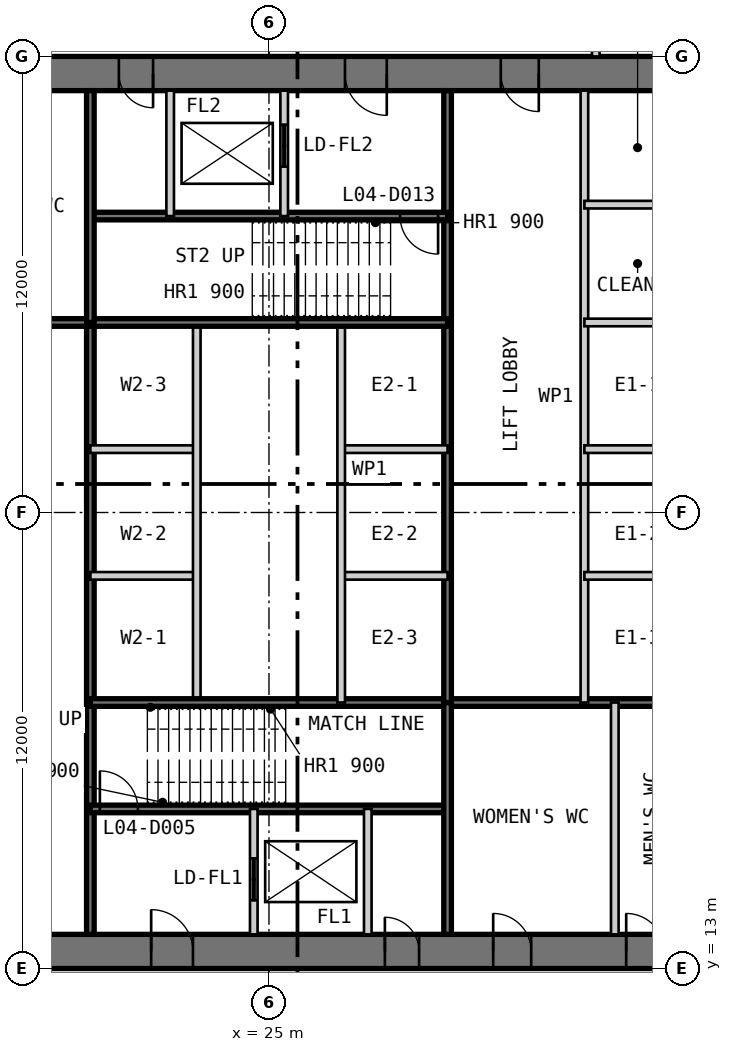
"""IFC4 building model, lengths in metres.
Left out: names, types, materials, properties, quantities, classifications, styles, units other than length and angle.
Written with IfcOpenShell. Run it as: python <this file> out.ifc"""

import sys

from ifc_helpers import new_model, si_unit, direction, frame, frame_2d, origin, place, context, subcontext, project, spatial, polyline, rectangle, outline, extrude, element, fill, save


model = new_model("IFC4")
c1 = context("Model", 3, precision=1e-05, world=origin(), true_north=direction((0.0, 1.0)))
c2 = subcontext(c1, "Body", "Model", "MODEL_VIEW")
j1 = project(units=[si_unit("LENGTHUNIT", "METRE"), si_unit("PLANEANGLEUNIT", "RADIAN")], contexts=[c1])
p1 = place(None, origin())
s1 = spatial("IfcSite", under=j1, at=p1, CompositionType="ELEMENT")
p2 = place(p1, origin())
s2 = spatial("IfcBuilding", under=s1, at=p2, CompositionType="ELEMENT")
p3 = place(p2, frame((0.0, 0.0, 21.4)))
s3 = spatial("IfcBuildingStorey", under=s2, at=p3, CompositionType="ELEMENT", Elevation=21.4)
p4 = place(p3, frame((13.0, 13.45, 0.0), z_axis=(0.0, 0.0, 1.0), x_axis=(1.0, 0.0, 0.0)))
e1 = element("IfcWall", 1, at=p4, inside=s3, PredefinedType="SHEAR", context=c2, shape_type="SweptSolid", body=[
    extrude(outline(polyline([(0.0, -0.45), (24.0, -0.45), (23.1, 0.45), (0.9, 0.45), (0.0, -0.45)])), origin(), (0.0, 0.0, 1.0), 4.8),
])
p5 = place(p4, frame((4.9, 0.0, 0.0)))
e2 = element("IfcOpeningElement", 2, at=p5, cuts=e1, PredefinedType="OPENING", context=c2, shape_type="SweptSolid", body=[
    extrude(rectangle(XDim=1.0, YDim=2.2, at=frame_2d((0.5, 1.1))), frame((0.0, 0.46, 0.0), z_axis=(0.0, -1.0, 0.0), x_axis=(1.0, 0.0, 0.0)), (0.0, 0.0, 1.0), 0.92),
])
p6 = place(p4, frame((8.9, 0.0, 0.0)))
e3 = element("IfcOpeningElement", 3, at=p6, cuts=e1, PredefinedType="OPENING", context=c2, shape_type="SweptSolid", body=[
    extrude(rectangle(XDim=1.1, YDim=2.2, at=frame_2d((0.55, 1.1))), frame((0.0, 0.46, 0.0), z_axis=(0.0, -1.0, 0.0), x_axis=(1.0, 0.0, 0.0)), (0.0, 0.0, 1.0), 0.92),
])
p7 = place(p4, frame((15.05, 0.0, 0.0)))
e4 = element("IfcOpeningElement", 4, at=p7, cuts=e1, PredefinedType="OPENING", context=c2, shape_type="SweptSolid", body=[
    extrude(rectangle(XDim=0.9, YDim=2.2, at=frame_2d((0.45, 1.1))), frame((0.0, 0.46, 0.0), z_axis=(0.0, -1.0, 0.0), x_axis=(1.0, 0.0, 0.0)), (0.0, 0.0, 1.0), 0.92),
])
p8 = place(p4, frame((17.9, 0.0, 0.0)))
e5 = element("IfcOpeningElement", 5, at=p8, cuts=e1, PredefinedType="OPENING", context=c2, shape_type="SweptSolid", body=[
    extrude(rectangle(XDim=1.0, YDim=2.2, at=frame_2d((0.5, 1.1))), frame((0.0, 0.46, 0.0), z_axis=(0.0, -1.0, 0.0), x_axis=(1.0, 0.0, 0.0)), (0.0, 0.0, 1.0), 0.92),
])
p9 = place(p4, frame((21.4, 0.0, 0.0)))
e6 = element("IfcOpeningElement", 6, at=p9, cuts=e1, PredefinedType="OPENING", context=c2, shape_type="SweptSolid", body=[
    extrude(rectangle(XDim=1.0, YDim=2.2, at=frame_2d((0.5, 1.1))), frame((0.0, 0.46, 0.0), z_axis=(0.0, -1.0, 0.0), x_axis=(1.0, 0.0, 0.0)), (0.0, 0.0, 1.0), 0.92),
])
p10 = place(p3, frame((37.0, 36.55, 0.0), z_axis=(0.0, 0.0, 1.0), x_axis=(-1.0, 0.0, 0.0)))
e7 = element("IfcWall", 7, at=p10, inside=s3, PredefinedType="SHEAR", context=c2, shape_type="SweptSolid", body=[
    extrude(outline(polyline([(0.0, -0.45), (24.0, -0.45), (23.1, 0.45), (0.9, 0.45), (0.0, -0.45)])), origin(), (0.0, 0.0, 1.0), 4.8),
])
p11 = place(p10, frame((4.9, 0.0, 0.0)))
e8 = element("IfcOpeningElement", 8, at=p11, cuts=e7, PredefinedType="OPENING", context=c2, shape_type="SweptSolid", body=[
    extrude(rectangle(XDim=1.0, YDim=2.2, at=frame_2d((0.5, 1.1))), frame((0.0, 0.46, 0.0), z_axis=(0.0, -1.0, 0.0), x_axis=(1.0, 0.0, 0.0)), (0.0, 0.0, 1.0), 0.92),
])
p12 = place(p10, frame((8.9, 0.0, 0.0)))
e9 = element("IfcOpeningElement", 9, at=p12, cuts=e7, PredefinedType="OPENING", context=c2, shape_type="SweptSolid", body=[
    extrude(rectangle(XDim=1.1, YDim=2.2, at=frame_2d((0.55, 1.1))), frame((0.0, 0.46, 0.0), z_axis=(0.0, -1.0, 0.0), x_axis=(1.0, 0.0, 0.0)), (0.0, 0.0, 1.0), 0.92),
])
p13 = place(p10, frame((15.05, 0.0, 0.0)))
e10 = element("IfcOpeningElement", 10, at=p13, cuts=e7, PredefinedType="OPENING", context=c2, shape_type="SweptSolid", body=[
    extrude(rectangle(XDim=0.9, YDim=2.2, at=frame_2d((0.45, 1.1))), frame((0.0, 0.46, 0.0), z_axis=(0.0, -1.0, 0.0), x_axis=(1.0, 0.0, 0.0)), (0.0, 0.0, 1.0), 0.92),
])
p14 = place(p10, frame((17.9, 0.0, 0.0)))
e11 = element("IfcOpeningElement", 11, at=p14, cuts=e7, PredefinedType="OPENING", context=c2, shape_type="SweptSolid", body=[
    extrude(rectangle(XDim=1.0, YDim=2.2, at=frame_2d((0.5, 1.1))), frame((0.0, 0.46, 0.0), z_axis=(0.0, -1.0, 0.0), x_axis=(1.0, 0.0, 0.0)), (0.0, 0.0, 1.0), 0.92),
])
p15 = place(p10, frame((21.4, 0.0, 0.0)))
e12 = element("IfcOpeningElement", 12, at=p15, cuts=e7, PredefinedType="OPENING", context=c2, shape_type="SweptSolid", body=[
    extrude(rectangle(XDim=1.0, YDim=2.2, at=frame_2d((0.5, 1.1))), frame((0.0, 0.46, 0.0), z_axis=(0.0, -1.0, 0.0), x_axis=(1.0, 0.0, 0.0)), (0.0, 0.0, 1.0), 0.92),
])
p16 = place(p3, frame((20.3, 13.9, 0.0), z_axis=(0.0, 0.0, 1.0), x_axis=(0.0, 1.0, 0.0)))
e13 = element("IfcWall", 13, at=p16, inside=s3, PredefinedType="SOLIDWALL", context=c2, shape_type="SweptSolid", body=[
    extrude(rectangle(XDim=16.1, YDim=0.2, at=frame_2d((8.05, 0.0))), origin(), (0.0, 0.0, 1.0), 4.6),
])
for number, where, z_axis, x_axis in (
    (14, (20.3, 23.333, 0.0), (0.0, 0.0, 1.0), (1.0, 0.0, 0.0)),
    (15, (20.3, 26.667, 0.0), (0.0, 0.0, 1.0), (1.0, 0.0, 0.0)),
):
    element("IfcWall", number, at=place(p3, frame(where, z_axis=z_axis, x_axis=x_axis)), inside=s3, PredefinedType="PARTITIONING", context=c2, shape_type="SweptSolid", body=[
        extrude(rectangle(XDim=2.8, YDim=0.2, at=frame_2d((1.4, 0.0))), origin(), (0.0, 0.0, 1.0), 4.6),
    ])
p17 = place(p3, frame((23.1, 20.0, 0.0), z_axis=(0.0, 0.0, 1.0), x_axis=(0.0, 1.0, 0.0)))
e16 = element("IfcWall", 16, at=p17, inside=s3, PredefinedType="PARTITIONING", context=c2, shape_type="SweptSolid", body=[
    extrude(rectangle(XDim=10.0, YDim=0.2, at=frame_2d((5.0, 0.0))), origin(), (0.0, 0.0, 1.0), 4.6),
])
p18 = place(p3, frame((20.3, 17.2, 0.0), z_axis=(0.0, 0.0, 1.0), x_axis=(1.0, 0.0, 0.0)))
e17 = element("IfcWall", 17, at=p18, inside=s3, PredefinedType="SOLIDWALL", context=c2, shape_type="SweptSolid", body=[
    extrude(rectangle(XDim=9.4, YDim=0.2, at=frame_2d((4.7, 0.0))), origin(), (0.0, 0.0, 1.0), 4.6),
])
p19 = place(p18, frame((0.25, 0.0, 0.0)))
e18 = element("IfcOpeningElement", 18, at=p19, cuts=e17, PredefinedType="OPENING", context=c2, shape_type="SweptSolid", body=[
    extrude(rectangle(XDim=1.0, YDim=2.2, at=frame_2d((0.5, 1.1))), frame((0.0, 0.11, 0.0), z_axis=(0.0, -1.0, 0.0), x_axis=(1.0, 0.0, 0.0)), (0.0, 0.0, 1.0), 0.22),
])
p20 = place(p3, frame((20.3, 20.0, 0.0), z_axis=(0.0, 0.0, 1.0), x_axis=(1.0, 0.0, 0.0)))
e19 = element("IfcWall", 19, at=p20, inside=s3, PredefinedType="SOLIDWALL", context=c2, shape_type="SweptSolid", body=[
    extrude(rectangle(XDim=15.8, YDim=0.2, at=frame_2d((7.9, 0.0))), origin(), (0.0, 0.0, 1.0), 4.6),
])
p21 = place(p3, frame((24.6, 13.9, 0.0), z_axis=(0.0, 0.0, 1.0), x_axis=(0.0, 1.0, 0.0)))
e20 = element("IfcWall", 20, at=p21, inside=s3, PredefinedType="PARTITIONING", context=c2, shape_type="SweptSolid", body=[
    extrude(rectangle(XDim=3.3, YDim=0.2, at=frame_2d((1.65, 0.0))), origin(), (0.0, 0.0, 1.0), 4.6),
])
p22 = place(p21, frame((0.9, 0.0, 0.0)))
e21 = element("IfcOpeningElement", 21, at=p22, cuts=e20, PredefinedType="OPENING", context=c2, shape_type="SweptSolid", body=[
    extrude(rectangle(XDim=1.1, YDim=2.2, at=frame_2d((0.55, 1.1))), frame((0.0, 0.11, 0.0), z_axis=(0.0, -1.0, 0.0), x_axis=(1.0, 0.0, 0.0)), (0.0, 0.0, 1.0), 0.22),
])
p23 = place(p3, frame((27.6, 13.9, 0.0), z_axis=(0.0, 0.0, 1.0), x_axis=(0.0, 1.0, 0.0)))
e22 = element("IfcWall", 22, at=p23, inside=s3, PredefinedType="PARTITIONING", context=c2, shape_type="SweptSolid", body=[
    extrude(rectangle(XDim=3.3, YDim=0.2, at=frame_2d((1.65, 0.0))), origin(), (0.0, 0.0, 1.0), 4.6),
])
p24 = place(p3, frame((29.7, 13.9, 0.0), z_axis=(0.0, 0.0, 1.0), x_axis=(0.0, 1.0, 0.0)))
e23 = element("IfcWall", 23, at=p24, inside=s3, PredefinedType="SOLIDWALL", context=c2, shape_type="SweptSolid", body=[
    extrude(rectangle(XDim=6.1, YDim=0.2, at=frame_2d((3.05, 0.0))), origin(), (0.0, 0.0, 1.0), 4.6),
])
p25 = place(p3, frame((34.1, 13.9, 0.0), z_axis=(0.0, 0.0, 1.0), x_axis=(0.0, 1.0, 0.0)))
e24 = element("IfcWall", 24, at=p25, inside=s3, PredefinedType="PARTITIONING", context=c2, shape_type="SweptSolid", body=[
    extrude(rectangle(XDim=6.1, YDim=0.2, at=frame_2d((3.05, 0.0))), origin(), (0.0, 0.0, 1.0), 4.6),
])
p26 = place(p3, frame((33.3, 36.1, 0.0), z_axis=(0.0, 0.0, 1.0), x_axis=(0.0, -1.0, 0.0)))
e25 = element("IfcWall", 25, at=p26, inside=s3, PredefinedType="PARTITIONING", context=c2, shape_type="SweptSolid", body=[
    extrude(rectangle(XDim=16.1, YDim=0.2, at=frame_2d((8.05, 0.0))), origin(), (0.0, 0.0, 1.0), 4.6),
])
p27 = place(p3, frame((29.7, 36.1, 0.0), z_axis=(0.0, 0.0, 1.0), x_axis=(0.0, -1.0, 0.0)))
e26 = element("IfcWall", 26, at=p27, inside=s3, PredefinedType="SOLIDWALL", context=c2, shape_type="SweptSolid", body=[
    extrude(rectangle(XDim=16.1, YDim=0.2, at=frame_2d((8.05, 0.0))), origin(), (0.0, 0.0, 1.0), 4.6),
])
for number, where, z_axis, x_axis in (
    (27, (36.1, 30.0, 0.0), (0.0, 0.0, 1.0), (-1.0, 0.0, 0.0)),
    (28, (36.1, 26.667, 0.0), (0.0, 0.0, 1.0), (-1.0, 0.0, 0.0)),
    (29, (36.1, 23.333, 0.0), (0.0, 0.0, 1.0), (-1.0, 0.0, 0.0)),
    (30, (29.7, 26.667, 0.0), (0.0, 0.0, 1.0), (-1.0, 0.0, 0.0)),
    (31, (29.7, 23.333, 0.0), (0.0, 0.0, 1.0), (-1.0, 0.0, 0.0)),
):
    element("IfcWall", number, at=place(p3, frame(where, z_axis=z_axis, x_axis=x_axis)), inside=s3, PredefinedType="PARTITIONING", context=c2, shape_type="SweptSolid", body=[
        extrude(rectangle(XDim=2.8, YDim=0.2, at=frame_2d((1.4, 0.0))), origin(), (0.0, 0.0, 1.0), 4.6),
    ])
p28 = place(p3, frame((26.9, 30.0, 0.0), z_axis=(0.0, 0.0, 1.0), x_axis=(0.0, -1.0, 0.0)))
e32 = element("IfcWall", 32, at=p28, inside=s3, PredefinedType="PARTITIONING", context=c2, shape_type="SweptSolid", body=[
    extrude(rectangle(XDim=10.0, YDim=0.2, at=frame_2d((5.0, 0.0))), origin(), (0.0, 0.0, 1.0), 4.6),
])
p29 = place(p3, frame((29.7, 32.8, 0.0), z_axis=(0.0, 0.0, 1.0), x_axis=(-1.0, 0.0, 0.0)))
e33 = element("IfcWall", 33, at=p29, inside=s3, PredefinedType="SOLIDWALL", context=c2, shape_type="SweptSolid", body=[
    extrude(rectangle(XDim=9.4, YDim=0.2, at=frame_2d((4.7, 0.0))), origin(), (0.0, 0.0, 1.0), 4.6),
])
p30 = place(p29, frame((0.25, 0.0, 0.0)))
e34 = element("IfcOpeningElement", 34, at=p30, cuts=e33, PredefinedType="OPENING", context=c2, shape_type="SweptSolid", body=[
    extrude(rectangle(XDim=1.0, YDim=2.2, at=frame_2d((0.5, 1.1))), frame((0.0, 0.11, 0.0), z_axis=(0.0, -1.0, 0.0), x_axis=(1.0, 0.0, 0.0)), (0.0, 0.0, 1.0), 0.22),
])
p31 = place(p3, frame((29.7, 30.0, 0.0), z_axis=(0.0, 0.0, 1.0), x_axis=(-1.0, 0.0, 0.0)))
e35 = element("IfcWall", 35, at=p31, inside=s3, PredefinedType="SOLIDWALL", context=c2, shape_type="SweptSolid", body=[
    extrude(rectangle(XDim=15.8, YDim=0.2, at=frame_2d((7.9, 0.0))), origin(), (0.0, 0.0, 1.0), 4.6),
])
p32 = place(p3, frame((25.4, 36.1, 0.0), z_axis=(0.0, 0.0, 1.0), x_axis=(0.0, -1.0, 0.0)))
e36 = element("IfcWall", 36, at=p32, inside=s3, PredefinedType="PARTITIONING", context=c2, shape_type="SweptSolid", body=[
    extrude(rectangle(XDim=3.3, YDim=0.2, at=frame_2d((1.65, 0.0))), origin(), (0.0, 0.0, 1.0), 4.6),
])
p33 = place(p32, frame((0.9, 0.0, 0.0)))
e37 = element("IfcOpeningElement", 37, at=p33, cuts=e36, PredefinedType="OPENING", context=c2, shape_type="SweptSolid", body=[
    extrude(rectangle(XDim=1.1, YDim=2.2, at=frame_2d((0.55, 1.1))), frame((0.0, 0.11, 0.0), z_axis=(0.0, -1.0, 0.0), x_axis=(1.0, 0.0, 0.0)), (0.0, 0.0, 1.0), 0.22),
])
p34 = place(p3, frame((22.4, 36.1, 0.0), z_axis=(0.0, 0.0, 1.0), x_axis=(0.0, -1.0, 0.0)))
e38 = element("IfcWall", 38, at=p34, inside=s3, PredefinedType="PARTITIONING", context=c2, shape_type="SweptSolid", body=[
    extrude(rectangle(XDim=3.3, YDim=0.2, at=frame_2d((1.65, 0.0))), origin(), (0.0, 0.0, 1.0), 4.6),
])
p35 = place(p3, frame((20.3, 36.1, 0.0), z_axis=(0.0, 0.0, 1.0), x_axis=(0.0, -1.0, 0.0)))
e39 = element("IfcWall", 39, at=p35, inside=s3, PredefinedType="SOLIDWALL", context=c2, shape_type="SweptSolid", body=[
    extrude(rectangle(XDim=6.1, YDim=0.2, at=frame_2d((3.05, 0.0))), origin(), (0.0, 0.0, 1.0), 4.6),
])
p36 = place(p3, frame((36.1, 33.1, 0.0), z_axis=(0.0, 0.0, 1.0), x_axis=(-1.0, 0.0, 0.0)))
e40 = element("IfcWall", 40, at=p36, inside=s3, PredefinedType="PARTITIONING", context=c2, shape_type="SweptSolid", body=[
    extrude(rectangle(XDim=2.8, YDim=0.2, at=frame_2d((1.4, 0.0))), origin(), (0.0, 0.0, 1.0), 4.6),
])
p37 = place(p3, frame((33.6, 37.0, 0.0), z_axis=(0.0, 0.0, 1.0), x_axis=(0.0, 1.0, 0.0)))
e41 = element("IfcWall", 41, at=p37, inside=s3, PredefinedType="PARTITIONING", context=c2, shape_type="SweptSolid", body=[
    extrude(rectangle(XDim=6.0, YDim=0.2, at=frame_2d((3.0, 0.0))), origin(), (0.0, 0.0, 1.0), 4.5),
])
p38 = place(p37, frame((2.55, 0.0, 0.0)))
e42 = element("IfcOpeningElement", 42, at=p38, cuts=e41, PredefinedType="OPENING", context=c2, shape_type="SweptSolid", body=[
    extrude(rectangle(XDim=0.9, YDim=2.2, at=frame_2d((0.45, 1.1))), frame((0.0, 0.11, 0.0), z_axis=(0.0, -1.0, 0.0), x_axis=(1.0, 0.0, 0.0)), (0.0, 0.0, 1.0), 0.22),
])
p39 = place(p6, origin())
e43 = element("IfcDoor", 43, at=p39, inside=s3, OperationType="SINGLE_SWING_LEFT", PredefinedType="DOOR", context=c2, shape_type="SweptSolid", body=[
    extrude(rectangle(XDim=1.1, YDim=2.2, at=frame_2d((0.55, 1.1))), frame((0.0, 0.025, 0.0), z_axis=(0.0, -1.0, 0.0), x_axis=(1.0, 0.0, 0.0)), (0.0, 0.0, 1.0), 0.05),
    extrude(outline(polyline([(0.0, 0.0), (0.04, 0.0), (0.04, 2.16), (1.06, 2.16), (1.06, 0.0), (1.1, 0.0), (1.1, 2.2), (0.0, 2.2), (0.0, 0.0)])), frame((0.0, 0.3, 0.0), z_axis=(0.0, -1.0, 0.0), x_axis=(1.0, 0.0, 0.0)), (0.0, 0.0, 1.0), 0.6),
])
fill(e3, e43)
p40 = place(p19, origin())
e44 = element("IfcDoor", 44, at=p40, inside=s3, OperationType="SINGLE_SWING_LEFT", PredefinedType="DOOR", context=c2, shape_type="SweptSolid", body=[
    extrude(rectangle(XDim=1.0, YDim=2.2, at=frame_2d((0.5, 1.1))), frame((0.0, 0.025, 0.0), z_axis=(0.0, -1.0, 0.0), x_axis=(1.0, 0.0, 0.0)), (0.0, 0.0, 1.0), 0.05),
])
fill(e18, e44)
p41 = place(p7, origin())
e45 = element("IfcDoor", 45, at=p41, inside=s3, OperationType="SINGLE_SWING_LEFT", PredefinedType="DOOR", context=c2, shape_type="SweptSolid", body=[
    extrude(rectangle(XDim=0.9, YDim=2.2, at=frame_2d((0.45, 1.1))), frame((0.0, 0.025, 0.0), z_axis=(0.0, -1.0, 0.0), x_axis=(1.0, 0.0, 0.0)), (0.0, 0.0, 1.0), 0.05),
    extrude(outline(polyline([(0.0, 0.0), (0.04, 0.0), (0.04, 2.16), (0.86, 2.16), (0.86, 0.0), (0.9, 0.0), (0.9, 2.2), (0.0, 2.2), (0.0, 0.0)])), frame((0.0, 0.3, 0.0), z_axis=(0.0, -1.0, 0.0), x_axis=(1.0, 0.0, 0.0)), (0.0, 0.0, 1.0), 0.6),
])
fill(e4, e45)
p42 = place(p8, origin())
e46 = element("IfcDoor", 46, at=p42, inside=s3, OperationType="SINGLE_SWING_LEFT", PredefinedType="DOOR", context=c2, shape_type="SweptSolid", body=[
    extrude(rectangle(XDim=1.0, YDim=2.2, at=frame_2d((0.5, 1.1))), frame((0.0, 0.025, 0.0), z_axis=(0.0, -1.0, 0.0), x_axis=(1.0, 0.0, 0.0)), (0.0, 0.0, 1.0), 0.05),
    extrude(outline(polyline([(0.0, 0.0), (0.04, 0.0), (0.04, 2.16), (0.96, 2.16), (0.96, 0.0), (1.0, 0.0), (1.0, 2.2), (0.0, 2.2), (0.0, 0.0)])), frame((0.0, 0.3, 0.0), z_axis=(0.0, -1.0, 0.0), x_axis=(1.0, 0.0, 0.0)), (0.0, 0.0, 1.0), 0.6),
])
fill(e5, e46)
p43 = place(p9, origin())
e47 = element("IfcDoor", 47, at=p43, inside=s3, OperationType="SINGLE_SWING_LEFT", PredefinedType="DOOR", context=c2, shape_type="SweptSolid", body=[
    extrude(rectangle(XDim=1.0, YDim=2.2, at=frame_2d((0.5, 1.1))), frame((0.0, 0.025, 0.0), z_axis=(0.0, -1.0, 0.0), x_axis=(1.0, 0.0, 0.0)), (0.0, 0.0, 1.0), 0.05),
    extrude(outline(polyline([(0.0, 0.0), (0.04, 0.0), (0.04, 2.16), (0.96, 2.16), (0.96, 0.0), (1.0, 0.0), (1.0, 2.2), (0.0, 2.2), (0.0, 0.0)])), frame((0.0, 0.3, 0.0), z_axis=(0.0, -1.0, 0.0), x_axis=(1.0, 0.0, 0.0)), (0.0, 0.0, 1.0), 0.6),
])
fill(e6, e47)
p44 = place(p11, origin())
e48 = element("IfcDoor", 48, at=p44, inside=s3, OperationType="SINGLE_SWING_LEFT", PredefinedType="DOOR", context=c2, shape_type="SweptSolid", body=[
    extrude(rectangle(XDim=1.0, YDim=2.2, at=frame_2d((0.5, 1.1))), frame((0.0, 0.025, 0.0), z_axis=(0.0, -1.0, 0.0), x_axis=(1.0, 0.0, 0.0)), (0.0, 0.0, 1.0), 0.05),
    extrude(outline(polyline([(0.0, 0.0), (0.04, 0.0), (0.04, 2.16), (0.96, 2.16), (0.96, 0.0), (1.0, 0.0), (1.0, 2.2), (0.0, 2.2), (0.0, 0.0)])), frame((0.0, 0.3, 0.0), z_axis=(0.0, -1.0, 0.0), x_axis=(1.0, 0.0, 0.0)), (0.0, 0.0, 1.0), 0.6),
])
fill(e8, e48)
p45 = place(p12, origin())
e49 = element("IfcDoor", 49, at=p45, inside=s3, OperationType="SINGLE_SWING_LEFT", PredefinedType="DOOR", context=c2, shape_type="SweptSolid", body=[
    extrude(rectangle(XDim=1.1, YDim=2.2, at=frame_2d((0.55, 1.1))), frame((0.0, 0.025, 0.0), z_axis=(0.0, -1.0, 0.0), x_axis=(1.0, 0.0, 0.0)), (0.0, 0.0, 1.0), 0.05),
    extrude(outline(polyline([(0.0, 0.0), (0.04, 0.0), (0.04, 2.16), (1.06, 2.16), (1.06, 0.0), (1.1, 0.0), (1.1, 2.2), (0.0, 2.2), (0.0, 0.0)])), frame((0.0, 0.3, 0.0), z_axis=(0.0, -1.0, 0.0), x_axis=(1.0, 0.0, 0.0)), (0.0, 0.0, 1.0), 0.6),
])
fill(e9, e49)
p46 = place(p30, origin())
e50 = element("IfcDoor", 50, at=p46, inside=s3, OperationType="SINGLE_SWING_LEFT", PredefinedType="DOOR", context=c2, shape_type="SweptSolid", body=[
    extrude(rectangle(XDim=1.0, YDim=2.2, at=frame_2d((0.5, 1.1))), frame((0.0, 0.025, 0.0), z_axis=(0.0, -1.0, 0.0), x_axis=(1.0, 0.0, 0.0)), (0.0, 0.0, 1.0), 0.05),
])
fill(e34, e50)
p47 = place(p13, origin())
e51 = element("IfcDoor", 51, at=p47, inside=s3, OperationType="SINGLE_SWING_LEFT", PredefinedType="DOOR", context=c2, shape_type="SweptSolid", body=[
    extrude(rectangle(XDim=0.9, YDim=2.2, at=frame_2d((0.45, 1.1))), frame((0.0, 0.025, 0.0), z_axis=(0.0, -1.0, 0.0), x_axis=(1.0, 0.0, 0.0)), (0.0, 0.0, 1.0), 0.05),
    extrude(outline(polyline([(0.0, 0.0), (0.04, 0.0), (0.04, 2.16), (0.86, 2.16), (0.86, 0.0), (0.9, 0.0), (0.9, 2.2), (0.0, 2.2), (0.0, 0.0)])), frame((0.0, 0.3, 0.0), z_axis=(0.0, -1.0, 0.0), x_axis=(1.0, 0.0, 0.0)), (0.0, 0.0, 1.0), 0.6),
])
fill(e10, e51)
p48 = place(p22, origin())
e52 = element("IfcDoor", 52, at=p48, inside=s3, OperationType="DOUBLE_DOOR_SLIDING", PredefinedType="DOOR", context=c2, shape_type="SweptSolid", body=[
    extrude(rectangle(XDim=1.1, YDim=2.2, at=frame_2d((0.55, 1.1))), frame((0.0, 0.025, 0.0), z_axis=(0.0, -1.0, 0.0), x_axis=(1.0, 0.0, 0.0)), (0.0, 0.0, 1.0), 0.05),
])
fill(e21, e52)
p49 = place(p33, origin())
e53 = element("IfcDoor", 53, at=p49, inside=s3, OperationType="DOUBLE_DOOR_SLIDING", PredefinedType="DOOR", context=c2, shape_type="SweptSolid", body=[
    extrude(rectangle(XDim=1.1, YDim=2.2, at=frame_2d((0.55, 1.1))), frame((0.0, 0.025, 0.0), z_axis=(0.0, -1.0, 0.0), x_axis=(1.0, 0.0, 0.0)), (0.0, 0.0, 1.0), 0.05),
])
fill(e37, e53)
save(model, sys.argv[1])
